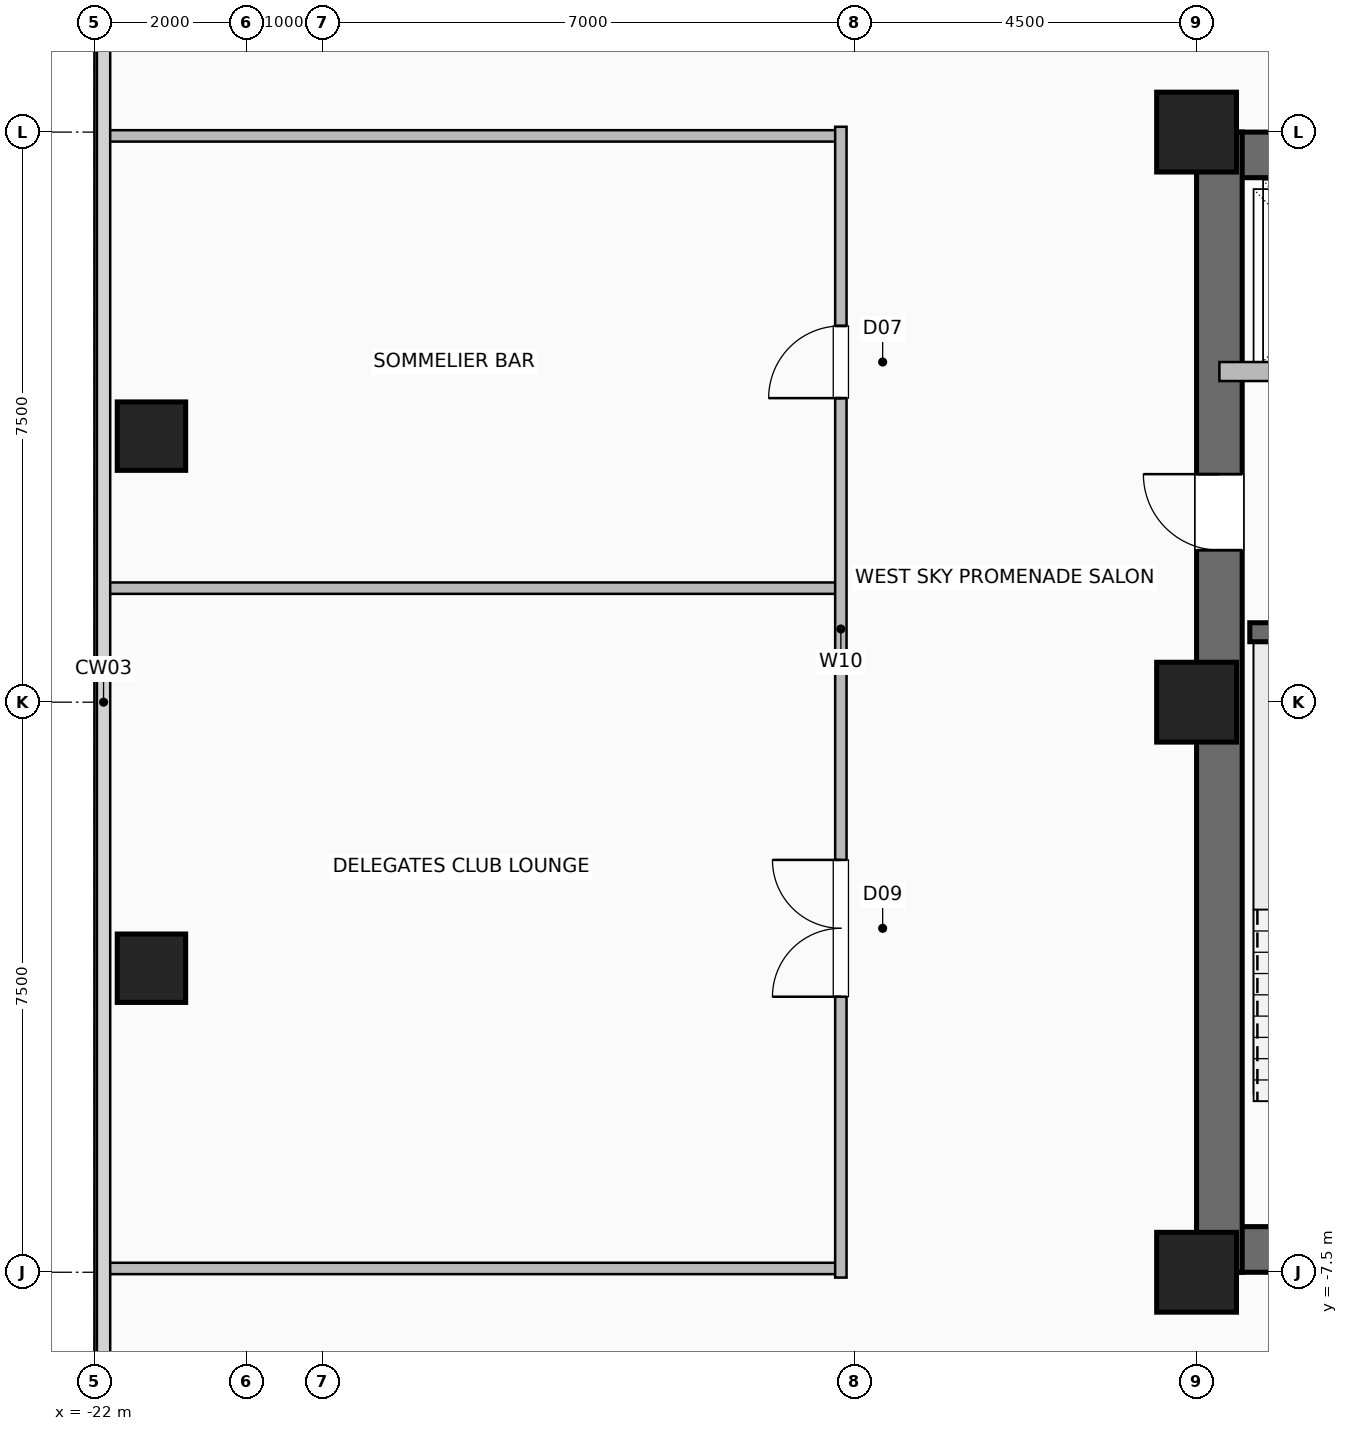
"""IFC4 building model, lengths in metres.
Left out: names, types, materials, properties, quantities, classifications, styles, units other than length and angle.
Written with IfcOpenShell. Run it as: python <this file> out.ifc"""

import sys

from ifc_helpers import new_model, si_unit, direction, frame, frame_2d, origin, origin_2d, place, context, subcontext, project, spatial, rectangle, hollow_rectangle, extrude, element, fill, save


model = new_model("IFC4")
c1 = context("Model", 3, precision=1e-05, world=origin(), true_north=direction((0.0, 1.0)))
c2 = subcontext(c1, "Body", "Model", "MODEL_VIEW")
j1 = project(units=[si_unit("LENGTHUNIT", "METRE"), si_unit("PLANEANGLEUNIT", "RADIAN")], contexts=[c1])
p1 = place(None, origin())
s1 = spatial("IfcSite", under=j1, at=p1, CompositionType="ELEMENT")
p2 = place(p1, origin())
s2 = spatial("IfcBuilding", under=s1, at=p2, CompositionType="ELEMENT")
p3 = place(p2, frame((0.0, 0.0, 119.2)))
s3 = spatial("IfcBuildingStorey", under=s2, at=p3, CompositionType="ELEMENT", Elevation=119.2)
for number, where, z_axis, x_axis in (
    (1, (-7.5, -7.5, 0.0), (0.0, 0.0, 1.0), (1.0, 0.0, 0.0)),
    (2, (-7.5, 7.5, 0.0), (0.0, 0.0, 1.0), (1.0, 0.0, 0.0)),
    (3, (-7.5, 0.0, 0.0), (0.0, 0.0, 1.0), (1.0, 0.0, 0.0)),
):
    element("IfcColumn", number, at=place(p3, frame(where, z_axis=z_axis, x_axis=x_axis)), inside=s3, PredefinedType="COLUMN", context=c2, shape_type="SweptSolid", body=[
        extrude(hollow_rectangle(XDim=1.05, YDim=1.05, WallThickness=0.05, at=origin_2d()), origin(), (0.0, 0.0, 1.0), 3.6),
    ])
for number, where, z_axis, x_axis in (
    (4, (-21.25, -3.5, 0.0), (0.0, 0.0, 1.0), (1.0, 0.0, 0.0)),
    (5, (-21.25, 3.5, 0.0), (0.0, 0.0, 1.0), (1.0, 0.0, 0.0)),
):
    element("IfcColumn", number, at=place(p3, frame(where, z_axis=z_axis, x_axis=x_axis)), inside=s3, PredefinedType="COLUMN", context=c2, shape_type="SweptSolid", body=[
        extrude(hollow_rectangle(XDim=0.9, YDim=0.9, WallThickness=0.045, at=origin_2d()), origin(), (0.0, 0.0, 1.0), 3.6),
    ])
p4 = place(p3, frame((-7.5, -7.2, 0.0), z_axis=(0.0, 0.0, 1.0), x_axis=(1.0, 0.0, 0.0)))
e6 = element("IfcWall", 6, at=p4, inside=s3, PredefinedType="SHEAR", context=c2, shape_type="SweptSolid", body=[
    extrude(rectangle(XDim=15.0, YDim=0.6, at=frame_2d((7.5, 0.0))), origin(), (0.0, 0.0, 1.0), 3.36),
])
p5 = place(p4, frame((1.55, 0.0, 0.0)))
e7 = element("IfcOpeningElement", 7, at=p5, cuts=e6, PredefinedType="OPENING", context=c2, shape_type="SweptSolid", body=[
    extrude(rectangle(XDim=1.05, YDim=2.08, at=frame_2d((0.525, 1.04))), frame((0.0, 0.31, 0.0), z_axis=(0.0, -1.0, 0.0), x_axis=(1.0, 0.0, 0.0)), (0.0, 0.0, 1.0), 0.62),
])
p6 = place(p4, frame((12.4, 0.0, 0.0)))
e8 = element("IfcOpeningElement", 8, at=p6, cuts=e6, PredefinedType="OPENING", context=c2, shape_type="SweptSolid", body=[
    extrude(rectangle(XDim=1.05, YDim=2.08, at=frame_2d((0.525, 1.04))), frame((0.0, 0.31, 0.0), z_axis=(0.0, -1.0, 0.0), x_axis=(1.0, 0.0, 0.0)), (0.0, 0.0, 1.0), 0.62),
])
p7 = place(p4, frame((5.2, 0.0, 0.0)))
e9 = element("IfcOpeningElement", 9, at=p7, cuts=e6, PredefinedType="OPENING", context=c2, shape_type="SweptSolid", body=[
    extrude(rectangle(XDim=1.0, YDim=2.08, at=frame_2d((0.5, 1.04))), frame((0.0, 0.31, 0.0), z_axis=(0.0, -1.0, 0.0), x_axis=(1.0, 0.0, 0.0)), (0.0, 0.0, 1.0), 0.62),
])
p8 = place(p4, frame((8.65, 0.0, 0.0)))
e10 = element("IfcOpeningElement", 10, at=p8, cuts=e6, PredefinedType="OPENING", context=c2, shape_type="SweptSolid", body=[
    extrude(rectangle(XDim=1.0, YDim=2.08, at=frame_2d((0.5, 1.04))), frame((0.0, 0.31, 0.0), z_axis=(0.0, -1.0, 0.0), x_axis=(1.0, 0.0, 0.0)), (0.0, 0.0, 1.0), 0.62),
])
p9 = place(p3, frame((-7.5, 7.2, 0.0), z_axis=(0.0, 0.0, 1.0), x_axis=(1.0, 0.0, 0.0)))
e11 = element("IfcWall", 11, at=p9, inside=s3, PredefinedType="SHEAR", context=c2, shape_type="SweptSolid", body=[
    extrude(rectangle(XDim=15.0, YDim=0.6, at=frame_2d((7.5, 0.0))), origin(), (0.0, 0.0, 1.0), 3.36),
])
p10 = place(p3, frame((-7.2, -7.5, 0.0), z_axis=(0.0, 0.0, 1.0), x_axis=(0.0, 1.0, 0.0)))
e12 = element("IfcWall", 12, at=p10, inside=s3, PredefinedType="SHEAR", context=c2, shape_type="SweptSolid", body=[
    extrude(rectangle(XDim=15.0, YDim=0.6, at=frame_2d((7.5, 0.0))), origin(), (0.0, 0.0, 1.0), 3.36),
])
p11 = place(p10, frame((9.5, 0.0, 0.0)))
e13 = element("IfcOpeningElement", 13, at=p11, cuts=e12, PredefinedType="OPENING", context=c2, shape_type="SweptSolid", body=[
    extrude(rectangle(XDim=1.0, YDim=2.08, at=frame_2d((0.5, 1.04))), frame((0.0, 0.31, 0.0), z_axis=(0.0, -1.0, 0.0), x_axis=(1.0, 0.0, 0.0)), (0.0, 0.0, 1.0), 0.62),
])
p12 = place(p3, frame((-6.8, 0.92, 0.0), z_axis=(0.0, 0.0, 1.0), x_axis=(1.0, 0.0, 0.0)))
e14 = element("IfcWall", 14, at=p12, inside=s3, PredefinedType="SHEAR", context=c2, shape_type="SweptSolid", body=[
    extrude(rectangle(XDim=3.33, YDim=0.25, at=frame_2d((1.665, 0.0))), origin(), (0.0, 0.0, 1.0), 3.36),
])
p13 = place(p3, frame((-7.2, 4.35, 0.0), z_axis=(0.0, 0.0, 1.0), x_axis=(1.0, 0.0, 0.0)))
e15 = element("IfcWall", 15, at=p13, inside=s3, PredefinedType="SHEAR", context=c2, shape_type="SweptSolid", body=[
    extrude(rectangle(XDim=2.7, YDim=0.25, at=frame_2d((1.35, 0.0))), origin(), (0.0, 0.0, 1.0), 3.36),
])
p14 = place(p13, frame((0.75, 0.0, 0.0)))
e16 = element("IfcOpeningElement", 16, at=p14, cuts=e15, PredefinedType="OPENING", context=c2, shape_type="SweptSolid", body=[
    extrude(rectangle(XDim=1.2, YDim=2.2, at=frame_2d((0.6, 1.1))), frame((0.0, 0.135, 0.0), z_axis=(0.0, -1.0, 0.0), x_axis=(1.0, 0.0, 0.0)), (0.0, 0.0, 1.0), 0.27),
])
for number, where, z_axis, x_axis in (
    (17, (-21.82, -7.45, 0.0), (0.0, 0.0, 1.0), (1.0, 0.0, 0.0)),
    (18, (-21.82, 1.5, 0.0), (0.0, 0.0, 1.0), (1.0, 0.0, 0.0)),
    (19, (-21.82, 7.45, 0.0), (0.0, 0.0, 1.0), (1.0, 0.0, 0.0)),
):
    element("IfcWall", number, at=place(p3, frame(where, z_axis=z_axis, x_axis=x_axis)), inside=s3, PredefinedType="PARTITIONING", context=c2, shape_type="SweptSolid", body=[
        extrude(rectangle(XDim=9.64, YDim=0.15, at=frame_2d((4.82, 0.0))), origin(), (0.0, 0.0, 1.0), 3.36),
    ])
p15 = place(p3, frame((-12.18, -7.57, 0.0), z_axis=(0.0, 0.0, 1.0), x_axis=(0.0, 1.0, 0.0)))
e20 = element("IfcWall", 20, at=p15, inside=s3, PredefinedType="PARTITIONING", context=c2, shape_type="SweptSolid", body=[
    extrude(rectangle(XDim=15.14, YDim=0.15, at=frame_2d((7.57, 0.0))), origin(), (0.0, 0.0, 1.0), 3.36),
])
p16 = place(p15, frame((3.695, 0.0, 0.0)))
e21 = element("IfcOpeningElement", 21, at=p16, cuts=e20, PredefinedType="OPENING", context=c2, shape_type="SweptSolid", body=[
    extrude(rectangle(XDim=1.8, YDim=2.08, at=frame_2d((0.9, 1.04))), frame((0.0, 0.085, 0.0), z_axis=(0.0, -1.0, 0.0), x_axis=(1.0, 0.0, 0.0)), (0.0, 0.0, 1.0), 0.17),
])
p17 = place(p15, frame((11.57, 0.0, 0.0)))
e22 = element("IfcOpeningElement", 22, at=p17, cuts=e20, PredefinedType="OPENING", context=c2, shape_type="SweptSolid", body=[
    extrude(rectangle(XDim=0.95, YDim=2.06, at=frame_2d((0.475, 1.03))), frame((0.0, 0.085, 0.0), z_axis=(0.0, -1.0, 0.0), x_axis=(1.0, 0.0, 0.0)), (0.0, 0.0, 1.0), 0.17),
])
p18 = place(p11, origin())
e23 = element("IfcDoor", 23, at=p18, inside=s3, OperationType="SINGLE_SWING_RIGHT", PredefinedType="DOOR", context=c2, shape_type="SweptSolid", body=[
    extrude(rectangle(XDim=1.0, YDim=2.08, at=frame_2d((0.5, 1.04))), frame((0.0, 0.025, 0.0), z_axis=(0.0, -1.0, 0.0), x_axis=(1.0, 0.0, 0.0)), (0.0, 0.0, 1.0), 0.05),
])
fill(e13, e23)
p19 = place(p16, origin())
e24 = element("IfcDoor", 24, at=p19, inside=s3, OperationType="DOUBLE_DOOR_SINGLE_SWING", PredefinedType="DOOR", context=c2, shape_type="SweptSolid", body=[
    extrude(rectangle(XDim=1.8, YDim=2.08, at=frame_2d((0.9, 1.04))), frame((0.0, 0.025, 0.0), z_axis=(0.0, -1.0, 0.0), x_axis=(1.0, 0.0, 0.0)), (0.0, 0.0, 1.0), 0.05),
])
fill(e21, e24)
p20 = place(p17, origin())
e25 = element("IfcDoor", 25, at=p20, inside=s3, OperationType="SINGLE_SWING_LEFT", PredefinedType="DOOR", context=c2, shape_type="SweptSolid", body=[
    extrude(rectangle(XDim=0.95, YDim=2.06, at=frame_2d((0.475, 1.03))), frame((0.0, 0.025, 0.0), z_axis=(0.0, -1.0, 0.0), x_axis=(1.0, 0.0, 0.0)), (0.0, 0.0, 1.0), 0.05),
])
fill(e22, e25)
save(model, sys.argv[1])
